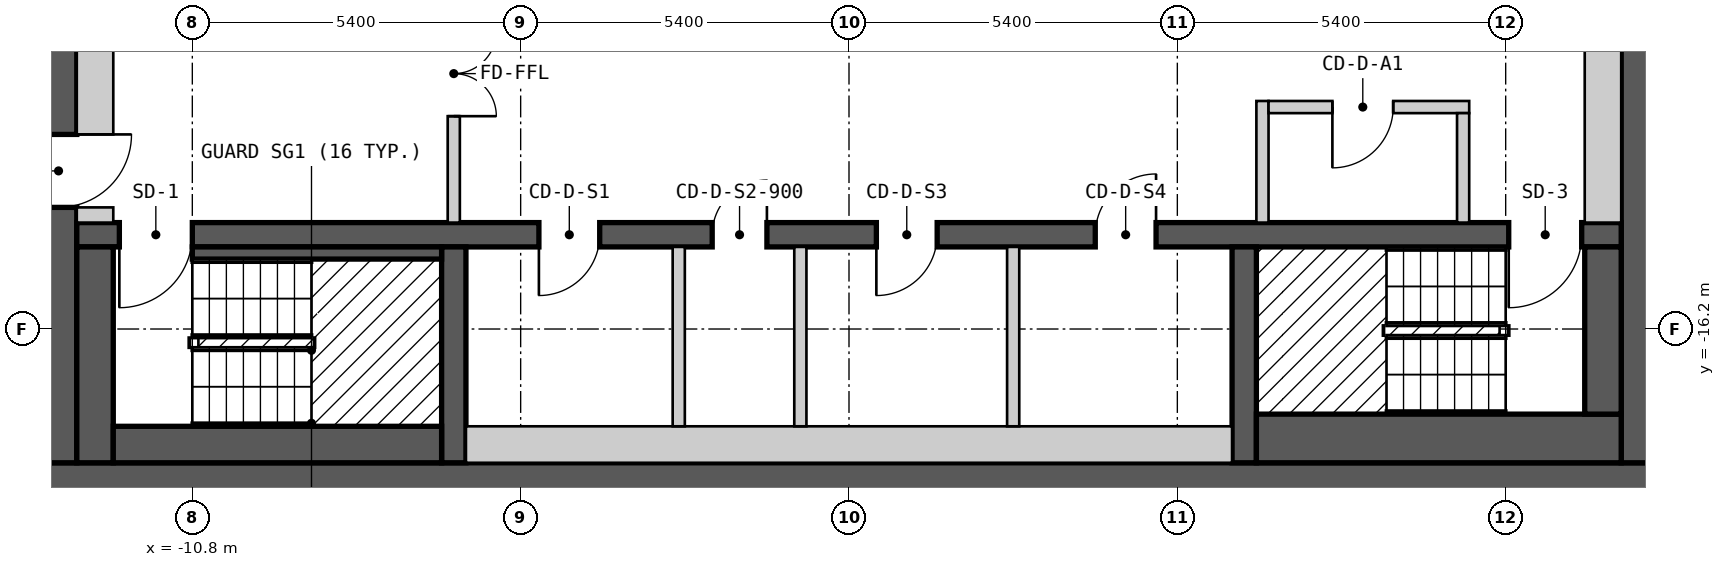
"""IFC4 building model, lengths in metres.
Left out: names, types, materials, properties, quantities, classifications, styles, units other than length and angle.
Written with IfcOpenShell. Run it as: python <this file> out.ifc"""

import sys

from ifc_helpers import new_model, si_unit, direction, frame, frame_2d, origin, place, context, subcontext, project, spatial, rectangle, extrude, element, fill, save


model = new_model("IFC4")
c1 = context("Model", 3, precision=1e-05, world=origin(), true_north=direction((0.0, 1.0)))
c2 = subcontext(c1, "Body", "Model", "MODEL_VIEW")
j1 = project(units=[si_unit("LENGTHUNIT", "METRE"), si_unit("PLANEANGLEUNIT", "RADIAN")], contexts=[c1])
p1 = place(None, origin())
s1 = spatial("IfcSite", under=j1, at=p1, CompositionType="ELEMENT")
p2 = place(p1, origin())
s2 = spatial("IfcBuilding", under=s1, at=p2, CompositionType="ELEMENT")
p3 = place(p2, frame((0.0, 0.0, 163.2)))
s3 = spatial("IfcBuildingStorey", under=s2, at=p3, CompositionType="ELEMENT", Elevation=163.2)
p4 = place(p3, frame((-13.3, -18.7, 0.0), z_axis=(0.0, 0.0, 1.0), x_axis=(1.0, 0.0, 0.0)))
e1 = element("IfcWall", 1, at=p4, inside=s3, PredefinedType="SHEAR", context=c2, shape_type="SweptSolid", body=[
    extrude(rectangle(XDim=26.6, YDim=0.6, at=frame_2d((13.3, 0.0))), origin(), (0.0, 0.0, 1.0), 2.7),
])
p5 = place(p3, frame((-13.0, -18.4, 0.0), z_axis=(0.0, 0.0, 1.0), x_axis=(0.0, 1.0, 0.0)))
e2 = element("IfcWall", 2, at=p5, inside=s3, PredefinedType="SHEAR", context=c2, shape_type="SweptSolid", body=[
    extrude(rectangle(XDim=12.8, YDim=0.6, at=frame_2d((6.4, 0.0))), origin(), (0.0, 0.0, 1.0), 2.7),
])
p6 = place(p5, frame((4.2, 0.0, 0.0)))
e3 = element("IfcOpeningElement", 3, at=p6, cuts=e2, PredefinedType="OPENING", context=c2, shape_type="SweptSolid", body=[
    extrude(rectangle(XDim=1.2, YDim=2.1, at=frame_2d((0.6, 1.05))), frame((0.0, 0.31, 0.0), z_axis=(0.0, -1.0, 0.0), x_axis=(1.0, 0.0, 0.0)), (0.0, 0.0, 1.0), 0.62),
])
p7 = place(p3, frame((13.0, -18.4, 0.0), z_axis=(0.0, 0.0, 1.0), x_axis=(0.0, 1.0, 0.0)))
e4 = element("IfcWall", 4, at=p7, inside=s3, PredefinedType="SHEAR", context=c2, shape_type="SweptSolid", body=[
    extrude(rectangle(XDim=12.8, YDim=0.6, at=frame_2d((6.4, 0.0))), origin(), (0.0, 0.0, 1.0), 2.7),
])
p8 = place(p3, frame((-12.7, -14.65, 0.0), z_axis=(0.0, 0.0, 1.0), x_axis=(1.0, 0.0, 0.0)))
e5 = element("IfcWall", 5, at=p8, inside=s3, PredefinedType="SHEAR", context=c2, shape_type="SweptSolid", body=[
    extrude(rectangle(XDim=25.4, YDim=0.4, at=frame_2d((12.7, 0.0))), origin(), (0.0, 0.0, 1.0), 2.7),
])
p9 = place(p8, frame((1.9, 0.0, 0.0), z_axis=(0.0, 0.0, 1.0), x_axis=(-1.0, 0.0, 0.0)))
e6 = element("IfcOpeningElement", 6, at=p9, cuts=e5, PredefinedType="OPENING", context=c2, shape_type="SweptSolid", body=[
    extrude(rectangle(XDim=1.2, YDim=2.1, at=frame_2d((0.6, 1.05))), frame((0.0, 0.21, 0.0), z_axis=(0.0, -1.0, 0.0), x_axis=(1.0, 0.0, 0.0)), (0.0, 0.0, 1.0), 0.42),
])
p10 = place(p8, frame((24.75, 0.0, 0.0), z_axis=(0.0, 0.0, 1.0), x_axis=(-1.0, 0.0, 0.0)))
e7 = element("IfcOpeningElement", 7, at=p10, cuts=e5, PredefinedType="OPENING", context=c2, shape_type="SweptSolid", body=[
    extrude(rectangle(XDim=1.2, YDim=2.1, at=frame_2d((0.6, 1.05))), frame((0.0, 0.21, 0.0), z_axis=(0.0, -1.0, 0.0), x_axis=(1.0, 0.0, 0.0)), (0.0, 0.0, 1.0), 0.42),
])
p11 = place(p8, frame((8.6, 0.0, 0.0), z_axis=(0.0, 0.0, 1.0), x_axis=(-1.0, 0.0, 0.0)))
e8 = element("IfcOpeningElement", 8, at=p11, cuts=e5, PredefinedType="OPENING", context=c2, shape_type="SweptSolid", body=[
    extrude(rectangle(XDim=1.0, YDim=2.1, at=frame_2d((0.5, 1.05))), frame((0.0, 0.21, 0.0), z_axis=(0.0, -1.0, 0.0), x_axis=(1.0, 0.0, 0.0)), (0.0, 0.0, 1.0), 0.42),
])
p12 = place(p8, frame((11.35, 0.0, 0.0), z_axis=(0.0, 0.0, 1.0), x_axis=(-1.0, 0.0, 0.0)))
e9 = element("IfcOpeningElement", 9, at=p12, cuts=e5, PredefinedType="OPENING", context=c2, shape_type="SweptSolid", body=[
    extrude(rectangle(XDim=0.9, YDim=2.1, at=frame_2d((0.45, 1.05))), frame((0.0, 0.21, 0.0), z_axis=(0.0, -1.0, 0.0), x_axis=(1.0, 0.0, 0.0)), (0.0, 0.0, 1.0), 0.42),
])
p13 = place(p8, frame((14.15, 0.0, 0.0), z_axis=(0.0, 0.0, 1.0), x_axis=(-1.0, 0.0, 0.0)))
e10 = element("IfcOpeningElement", 10, at=p13, cuts=e5, PredefinedType="OPENING", context=c2, shape_type="SweptSolid", body=[
    extrude(rectangle(XDim=1.0, YDim=2.1, at=frame_2d((0.5, 1.05))), frame((0.0, 0.21, 0.0), z_axis=(0.0, -1.0, 0.0), x_axis=(1.0, 0.0, 0.0)), (0.0, 0.0, 1.0), 0.42),
])
p14 = place(p8, frame((17.75, 0.0, 0.0), z_axis=(0.0, 0.0, 1.0), x_axis=(-1.0, 0.0, 0.0)))
e11 = element("IfcOpeningElement", 11, at=p14, cuts=e5, PredefinedType="OPENING", context=c2, shape_type="SweptSolid", body=[
    extrude(rectangle(XDim=1.0, YDim=2.1, at=frame_2d((0.5, 1.05))), frame((0.0, 0.21, 0.0), z_axis=(0.0, -1.0, 0.0), x_axis=(1.0, 0.0, 0.0)), (0.0, 0.0, 1.0), 0.42),
])
for number, where, z_axis, x_axis in (
    (12, (-6.5, -18.4, 0.0), (0.0, 0.0, 1.0), (0.0, 1.0, 0.0)),
    (13, (6.5, -18.4, 0.0), (0.0, 0.0, 1.0), (0.0, 1.0, 0.0)),
):
    element("IfcWall", number, at=place(p3, frame(where, z_axis=z_axis, x_axis=x_axis)), inside=s3, PredefinedType="SHEAR", context=c2, shape_type="SweptSolid", body=[
        extrude(rectangle(XDim=3.55, YDim=0.4, at=frame_2d((1.775, 0.0))), origin(), (0.0, 0.0, 1.0), 2.7),
    ])
p15 = place(p3, frame((-12.4, -18.4, 0.0), z_axis=(0.0, 0.0, 1.0), x_axis=(0.0, 1.0, 0.0)))
e14 = element("IfcWall", 14, at=p15, inside=s3, PredefinedType="SOLIDWALL", context=c2, shape_type="SweptSolid", body=[
    extrude(rectangle(XDim=3.55, YDim=0.6, at=frame_2d((1.775, 0.0))), origin(), (0.0, 0.0, 1.0), 2.7),
])
p16 = place(p3, frame((-12.7, -14.325, 0.0), z_axis=(0.0, 0.0, 1.0), x_axis=(1.0, 0.0, 0.0)))
e15 = element("IfcWall", 15, at=p16, inside=s3, PredefinedType="PARTITIONING", context=c2, shape_type="SweptSolid", body=[
    extrude(rectangle(XDim=0.6, YDim=0.25, at=frame_2d((0.3, 0.0))), origin(), (0.0, 0.0, 1.0), 2.7),
])
p17 = place(p3, frame((-12.4, -13.0, 0.0), z_axis=(0.0, 0.0, 1.0), x_axis=(0.0, 1.0, 0.0)))
e16 = element("IfcWall", 16, at=p17, inside=s3, PredefinedType="PARTITIONING", context=c2, shape_type="SweptSolid", body=[
    extrude(rectangle(XDim=3.45, YDim=0.6, at=frame_2d((1.725, 0.0))), origin(), (0.0, 0.0, 1.0), 2.7),
])
p18 = place(p3, frame((-12.1, -18.1, 0.0), z_axis=(0.0, 0.0, 1.0), x_axis=(1.0, 0.0, 0.0)))
e17 = element("IfcWall", 17, at=p18, inside=s3, PredefinedType="SOLIDWALL", context=c2, shape_type="SweptSolid", body=[
    extrude(rectangle(XDim=5.4, YDim=0.6, at=frame_2d((2.7, 0.0))), origin(), (0.0, 0.0, 1.0), 2.7),
])
p19 = place(p3, frame((-10.8, -14.95, 0.0), z_axis=(0.0, 0.0, 1.0), x_axis=(1.0, 0.0, 0.0)))
e18 = element("IfcWall", 18, at=p19, inside=s3, PredefinedType="SOLIDWALL", context=c2, shape_type="SweptSolid", body=[
    extrude(rectangle(XDim=4.1, YDim=0.2, at=frame_2d((2.05, 0.0))), origin(), (0.0, 0.0, 1.0), 2.7),
])
p20 = place(p3, frame((-6.5, -14.45, 0.0), z_axis=(0.0, 0.0, 1.0), x_axis=(0.0, 1.0, 0.0)))
e19 = element("IfcWall", 19, at=p20, inside=s3, PredefinedType="PARTITIONING", context=c2, shape_type="SweptSolid", body=[
    extrude(rectangle(XDim=4.9, YDim=0.2, at=frame_2d((2.45, 0.0))), origin(), (0.0, 0.0, 1.0), 2.7),
])
p21 = place(p20, frame((3.15, 0.0, 0.0), z_axis=(0.0, 0.0, 1.0), x_axis=(-1.0, 0.0, 0.0)))
e20 = element("IfcOpeningElement", 20, at=p21, cuts=e19, PredefinedType="OPENING", context=c2, shape_type="SweptSolid", body=[
    extrude(rectangle(XDim=1.4, YDim=2.1, at=frame_2d((0.7, 1.05))), frame((0.0, 0.11, 0.0), z_axis=(0.0, -1.0, 0.0), x_axis=(1.0, 0.0, 0.0)), (0.0, 0.0, 1.0), 0.22),
])
p22 = place(p3, frame((-6.3, -18.1, 0.0), z_axis=(0.0, 0.0, 1.0), x_axis=(1.0, 0.0, 0.0)))
e21 = element("IfcWall", 21, at=p22, inside=s3, PredefinedType="PARTITIONING", context=c2, shape_type="SweptSolid", body=[
    extrude(rectangle(XDim=12.6, YDim=0.6, at=frame_2d((6.3, 0.0))), origin(), (0.0, 0.0, 1.0), 2.7),
])
for number, where, z_axis, x_axis in (
    (22, (-2.8, -17.8, 0.0), (0.0, 0.0, 1.0), (0.0, 1.0, 0.0)),
    (23, (-0.8, -17.8, 0.0), (0.0, 0.0, 1.0), (0.0, 1.0, 0.0)),
    (24, (2.7, -17.8, 0.0), (0.0, 0.0, 1.0), (0.0, 1.0, 0.0)),
):
    element("IfcWall", number, at=place(p3, frame(where, z_axis=z_axis, x_axis=x_axis)), inside=s3, PredefinedType="PARTITIONING", context=c2, shape_type="SweptSolid", body=[
        extrude(rectangle(XDim=2.95, YDim=0.2, at=frame_2d((1.475, 0.0))), origin(), (0.0, 0.0, 1.0), 2.7),
    ])
p23 = place(p3, frame((6.7, -18.0, 0.0), z_axis=(0.0, 0.0, 1.0), x_axis=(1.0, 0.0, 0.0)))
e25 = element("IfcWall", 25, at=p23, inside=s3, PredefinedType="SOLIDWALL", context=c2, shape_type="SweptSolid", body=[
    extrude(rectangle(XDim=6.0, YDim=0.8, at=frame_2d((3.0, 0.0))), origin(), (0.0, 0.0, 1.0), 2.7),
])
p24 = place(p3, frame((6.8, -14.45, 0.0), z_axis=(0.0, 0.0, 1.0), x_axis=(0.0, 1.0, 0.0)))
e26 = element("IfcWall", 26, at=p24, inside=s3, PredefinedType="PARTITIONING", context=c2, shape_type="SweptSolid", body=[
    extrude(rectangle(XDim=2.0, YDim=0.2, at=frame_2d((1.0, 0.0))), origin(), (0.0, 0.0, 1.0), 2.7),
])
p25 = place(p3, frame((6.9, -12.55, 0.0), z_axis=(0.0, 0.0, 1.0), x_axis=(1.0, 0.0, 0.0)))
e27 = element("IfcWall", 27, at=p25, inside=s3, PredefinedType="PARTITIONING", context=c2, shape_type="SweptSolid", body=[
    extrude(rectangle(XDim=3.3, YDim=0.2, at=frame_2d((1.65, 0.0))), origin(), (0.0, 0.0, 1.0), 2.7),
])
p26 = place(p25, frame((2.05, 0.0, 0.0), z_axis=(0.0, 0.0, 1.0), x_axis=(-1.0, 0.0, 0.0)))
e28 = element("IfcOpeningElement", 28, at=p26, cuts=e27, PredefinedType="OPENING", context=c2, shape_type="SweptSolid", body=[
    extrude(rectangle(XDim=1.0, YDim=2.1, at=frame_2d((0.5, 1.05))), frame((0.0, 0.11, 0.0), z_axis=(0.0, -1.0, 0.0), x_axis=(1.0, 0.0, 0.0)), (0.0, 0.0, 1.0), 0.22),
])
p27 = place(p3, frame((10.1, -14.45, 0.0), z_axis=(0.0, 0.0, 1.0), x_axis=(0.0, 1.0, 0.0)))
e29 = element("IfcWall", 29, at=p27, inside=s3, PredefinedType="PARTITIONING", context=c2, shape_type="SweptSolid", body=[
    extrude(rectangle(XDim=1.8, YDim=0.2, at=frame_2d((0.9, 0.0))), origin(), (0.0, 0.0, 1.0), 2.7),
])
p28 = place(p3, frame((12.4, -17.6, 0.0), z_axis=(0.0, 0.0, 1.0), x_axis=(0.0, 1.0, 0.0)))
e30 = element("IfcWall", 30, at=p28, inside=s3, PredefinedType="SOLIDWALL", context=c2, shape_type="SweptSolid", body=[
    extrude(rectangle(XDim=2.75, YDim=0.6, at=frame_2d((1.375, 0.0))), origin(), (0.0, 0.0, 1.0), 2.7),
])
p29 = place(p3, frame((12.4, -14.45, 0.0), z_axis=(0.0, 0.0, 1.0), x_axis=(0.0, 1.0, 0.0)))
e31 = element("IfcWall", 31, at=p29, inside=s3, PredefinedType="PARTITIONING", context=c2, shape_type="SweptSolid", body=[
    extrude(rectangle(XDim=8.25, YDim=0.6, at=frame_2d((4.125, 0.0))), origin(), (0.0, 0.0, 1.0), 2.7),
])
p30 = place(p9, origin())
e32 = element("IfcDoor", 32, at=p30, inside=s3, OperationType="SINGLE_SWING_RIGHT", PredefinedType="DOOR", context=c2, shape_type="SweptSolid", body=[
    extrude(rectangle(XDim=1.2, YDim=2.1, at=frame_2d((0.6, 1.05))), frame((0.0, 0.025, 0.0), z_axis=(0.0, -1.0, 0.0), x_axis=(1.0, 0.0, 0.0)), (0.0, 0.0, 1.0), 0.05),
])
fill(e6, e32)
p31 = place(p10, origin())
e33 = element("IfcDoor", 33, at=p31, inside=s3, OperationType="SINGLE_SWING_RIGHT", PredefinedType="DOOR", context=c2, shape_type="SweptSolid", body=[
    extrude(rectangle(XDim=1.2, YDim=2.1, at=frame_2d((0.6, 1.05))), frame((0.0, 0.025, 0.0), z_axis=(0.0, -1.0, 0.0), x_axis=(1.0, 0.0, 0.0)), (0.0, 0.0, 1.0), 0.05),
])
fill(e7, e33)
p32 = place(p6, origin())
e34 = element("IfcDoor", 34, at=p32, inside=s3, OperationType="SINGLE_SWING_RIGHT", PredefinedType="DOOR", context=c2, shape_type="SweptSolid", body=[
    extrude(rectangle(XDim=1.2, YDim=2.1, at=frame_2d((0.6, 1.05))), frame((0.0, 0.025, 0.0), z_axis=(0.0, -1.0, 0.0), x_axis=(1.0, 0.0, 0.0)), (0.0, 0.0, 1.0), 0.05),
])
fill(e3, e34)
p33 = place(p21, origin())
e35 = element("IfcDoor", 35, at=p33, inside=s3, OperationType="DOUBLE_DOOR_SINGLE_SWING", PredefinedType="DOOR", context=c2, shape_type="SweptSolid", body=[
    extrude(rectangle(XDim=1.4, YDim=2.1, at=frame_2d((0.7, 1.05))), frame((0.0, 0.025, 0.0), z_axis=(0.0, -1.0, 0.0), x_axis=(1.0, 0.0, 0.0)), (0.0, 0.0, 1.0), 0.05),
])
fill(e20, e35)
p34 = place(p26, origin())
e36 = element("IfcDoor", 36, at=p34, inside=s3, OperationType="SINGLE_SWING_RIGHT", PredefinedType="DOOR", context=c2, shape_type="SweptSolid", body=[
    extrude(rectangle(XDim=1.0, YDim=2.1, at=frame_2d((0.5, 1.05))), frame((0.0, 0.025, 0.0), z_axis=(0.0, -1.0, 0.0), x_axis=(1.0, 0.0, 0.0)), (0.0, 0.0, 1.0), 0.05),
])
fill(e28, e36)
p35 = place(p11, origin())
e37 = element("IfcDoor", 37, at=p35, inside=s3, OperationType="SINGLE_SWING_RIGHT", PredefinedType="DOOR", context=c2, shape_type="SweptSolid", body=[
    extrude(rectangle(XDim=1.0, YDim=2.1, at=frame_2d((0.5, 1.05))), frame((0.0, 0.025, 0.0), z_axis=(0.0, -1.0, 0.0), x_axis=(1.0, 0.0, 0.0)), (0.0, 0.0, 1.0), 0.05),
])
fill(e8, e37)
p36 = place(p12, origin())
e38 = element("IfcDoor", 38, at=p36, inside=s3, OperationType="SINGLE_SWING_LEFT", PredefinedType="DOOR", context=c2, shape_type="SweptSolid", body=[
    extrude(rectangle(XDim=0.9, YDim=2.1, at=frame_2d((0.45, 1.05))), frame((0.0, 0.025, 0.0), z_axis=(0.0, -1.0, 0.0), x_axis=(1.0, 0.0, 0.0)), (0.0, 0.0, 1.0), 0.05),
])
fill(e9, e38)
p37 = place(p13, origin())
e39 = element("IfcDoor", 39, at=p37, inside=s3, OperationType="SINGLE_SWING_RIGHT", PredefinedType="DOOR", context=c2, shape_type="SweptSolid", body=[
    extrude(rectangle(XDim=1.0, YDim=2.1, at=frame_2d((0.5, 1.05))), frame((0.0, 0.025, 0.0), z_axis=(0.0, -1.0, 0.0), x_axis=(1.0, 0.0, 0.0)), (0.0, 0.0, 1.0), 0.05),
])
fill(e10, e39)
p38 = place(p14, origin())
e40 = element("IfcDoor", 40, at=p38, inside=s3, OperationType="SINGLE_SWING_LEFT", PredefinedType="DOOR", context=c2, shape_type="SweptSolid", body=[
    extrude(rectangle(XDim=1.0, YDim=2.1, at=frame_2d((0.5, 1.05))), frame((0.0, 0.025, 0.0), z_axis=(0.0, -1.0, 0.0), x_axis=(1.0, 0.0, 0.0)), (0.0, 0.0, 1.0), 0.05),
])
fill(e11, e40)
save(model, sys.argv[1])
